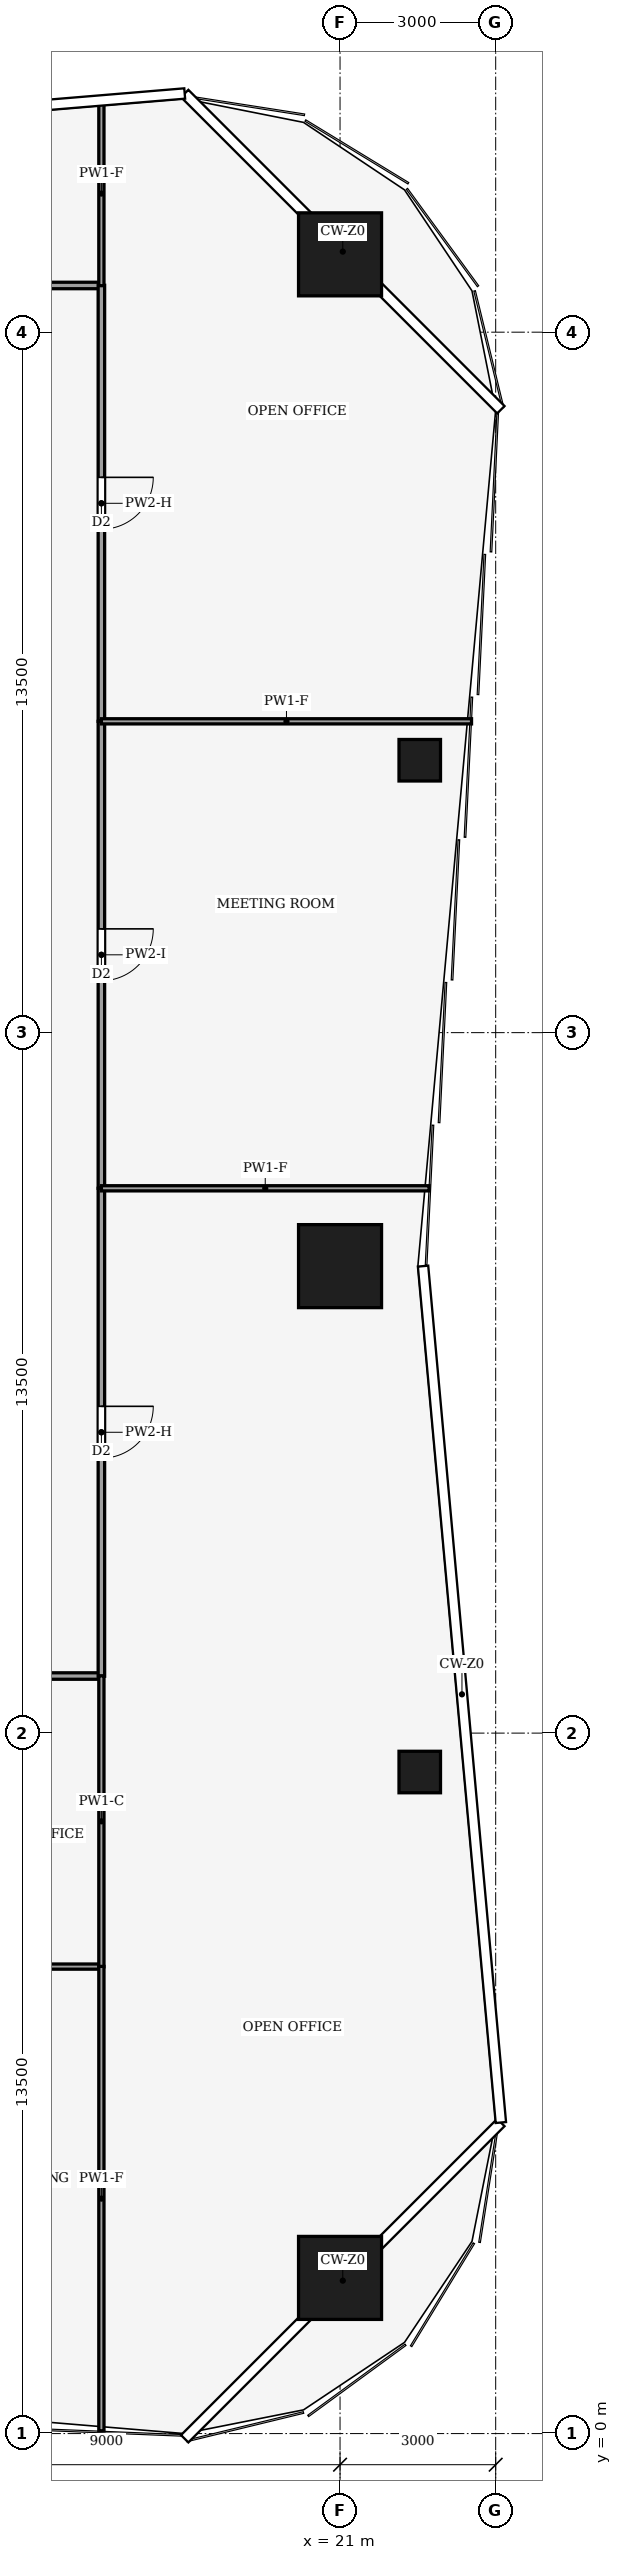
"""IFC4 building model, lengths in metres.
Left out: names, types, materials, properties, quantities, classifications, styles, units other than length and angle.
Written with IfcOpenShell. Run it as: python <this file> out.ifc"""

import sys

from ifc_helpers import new_model, si_unit, direction, frame, frame_2d, origin, origin_2d, place, context, subcontext, project, spatial, rectangle, hollow_rectangle, extrude, element, fill, save


model = new_model("IFC4")
c1 = context("Model", 3, precision=1e-05, world=origin(), true_north=direction((0.0, 1.0)))
c2 = subcontext(c1, "Body", "Model", "MODEL_VIEW")
j1 = project(units=[si_unit("LENGTHUNIT", "METRE"), si_unit("PLANEANGLEUNIT", "RADIAN")], contexts=[c1])
p1 = place(None, origin())
s1 = spatial("IfcSite", under=j1, at=p1, CompositionType="ELEMENT")
p2 = place(p1, origin())
s2 = spatial("IfcBuilding", under=s1, at=p2, CompositionType="ELEMENT")
p3 = place(p2, frame((0.0, 0.0, 46.0)))
s3 = spatial("IfcBuildingStorey", under=s2, at=p3, CompositionType="ELEMENT", Elevation=46.0)
for number, where, z_axis, x_axis in (
    (1, (21.0, 42.0, 0.0), (0.0, 0.0, 1.0), (1.0, 0.0, 0.0)),
    (2, (21.0, 22.5, 0.0), (0.0, 0.0, 1.0), (1.0, 0.0, 0.0)),
    (3, (21.0, 3.0, 0.0), (0.0, 0.0, 1.0), (1.0, 0.0, 0.0)),
):
    element("IfcColumn", number, at=place(p3, frame(where, z_axis=z_axis, x_axis=x_axis)), inside=s3, PredefinedType="COLUMN", context=c2, shape_type="SweptSolid", body=[
        extrude(hollow_rectangle(XDim=1.6, YDim=1.6, WallThickness=0.09, at=origin_2d()), origin(), (0.0, 0.0, 1.0), 4.0),
    ])
for number, where, z_axis, x_axis in (
    (4, (22.536, 12.75, 0.0), (0.0, 0.0, 1.0), (1.0, 0.0, 0.0)),
    (5, (22.536, 32.25, 0.0), (0.0, 0.0, 1.0), (1.0, 0.0, 0.0)),
):
    element("IfcColumn", number, at=place(p3, frame(where, z_axis=z_axis, x_axis=x_axis)), inside=s3, PredefinedType="COLUMN", context=c2, shape_type="SweptSolid", body=[
        extrude(hollow_rectangle(XDim=0.8, YDim=0.8, WallThickness=0.04, at=origin_2d()), origin(), (0.0, 0.0, 1.0), 4.0),
    ])
p4 = place(p3, frame((16.4, 14.6, 0.0), z_axis=(0.0, 0.0, 1.0), x_axis=(-1.0, 0.0, 0.0)))
e6 = element("IfcWall", 6, at=p4, inside=s3, PredefinedType="PARTITIONING", context=c2, shape_type="SweptSolid", body=[
    extrude(rectangle(XDim=4.4, YDim=0.125, at=frame_2d((2.2, 0.0))), origin(), (0.0, 0.0, 1.0), 3.29),
])
p5 = place(p4, frame((1.7, 0.0, 0.0)))
e7 = element("IfcOpeningElement", 7, at=p5, cuts=e6, PredefinedType="OPENING", context=c2, shape_type="SweptSolid", body=[
    extrude(rectangle(XDim=1.0, YDim=2.1, at=frame_2d((0.5, 1.05))), frame((0.0, 0.073, 0.0), z_axis=(0.0, -1.0, 0.0), x_axis=(1.0, 0.0, 0.0)), (0.0, 0.0, 1.0), 0.145),
])
p6 = place(p3, frame((6.0, 41.4, 0.0), z_axis=(0.0, 0.0, 1.0), x_axis=(1.0, 0.0, 0.0)))
e8 = element("IfcWall", 8, at=p6, inside=s3, PredefinedType="PARTITIONING", context=c2, shape_type="SweptSolid", body=[
    extrude(rectangle(XDim=10.4, YDim=0.125, at=frame_2d((5.2, 0.0))), origin(), (0.0, 0.0, 1.0), 3.54),
])
p7 = place(p6, frame((1.9, 0.0, 0.0)))
e9 = element("IfcOpeningElement", 9, at=p7, cuts=e8, PredefinedType="OPENING", context=c2, shape_type="SweptSolid", body=[
    extrude(rectangle(XDim=1.0, YDim=2.1, at=frame_2d((0.5, 1.05))), frame((0.0, 0.073, 0.0), z_axis=(0.0, -1.0, 0.0), x_axis=(1.0, 0.0, 0.0)), (0.0, 0.0, 1.0), 0.145),
])
p8 = place(p3, frame((16.4, 24.0, 0.0), z_axis=(0.0, 0.0, 1.0), x_axis=(0.0, -1.0, 0.0)))
e10 = element("IfcWall", 10, at=p8, inside=s3, PredefinedType="PARTITIONING", context=c2, shape_type="SweptSolid", body=[
    extrude(rectangle(XDim=9.404, YDim=0.125, at=frame_2d((4.702, 0.0))), origin(), (0.0, 0.0, 1.0), 3.14),
])
p9 = place(p8, frame((4.202, 0.0, 0.0)))
e11 = element("IfcOpeningElement", 11, at=p9, cuts=e10, PredefinedType="OPENING", context=c2, shape_type="SweptSolid", body=[
    extrude(rectangle(XDim=1.0, YDim=2.1, at=frame_2d((0.5, 1.05))), frame((0.0, 0.073, 0.0), z_axis=(0.0, -1.0, 0.0), x_axis=(1.0, 0.0, 0.0)), (0.0, 0.0, 1.0), 0.145),
])
p10 = place(p3, frame((16.4, 33.0, 0.0), z_axis=(0.0, 0.0, 1.0), x_axis=(0.0, -1.0, 0.0)))
e12 = element("IfcWall", 12, at=p10, inside=s3, PredefinedType="PARTITIONING", context=c2, shape_type="SweptSolid", body=[
    extrude(rectangle(XDim=9.0, YDim=0.125, at=frame_2d((4.5, 0.0))), origin(), (0.0, 0.0, 1.0), 3.48),
])
p11 = place(p10, frame((4.0, 0.0, 0.0)))
e13 = element("IfcOpeningElement", 13, at=p11, cuts=e12, PredefinedType="OPENING", context=c2, shape_type="SweptSolid", body=[
    extrude(rectangle(XDim=1.0, YDim=2.1, at=frame_2d((0.5, 1.05))), frame((0.0, 0.073, 0.0), z_axis=(0.0, -1.0, 0.0), x_axis=(1.0, 0.0, 0.0)), (0.0, 0.0, 1.0), 0.145),
])
p12 = place(p3, frame((16.4, 41.404, 0.0), z_axis=(0.0, 0.0, 1.0), x_axis=(0.0, -1.0, 0.0)))
e14 = element("IfcWall", 14, at=p12, inside=s3, PredefinedType="PARTITIONING", context=c2, shape_type="SweptSolid", body=[
    extrude(rectangle(XDim=8.404, YDim=0.125, at=frame_2d((4.202, 0.0))), origin(), (0.0, 0.0, 1.0), 3.14),
])
p13 = place(p12, frame((3.702, 0.0, 0.0)))
e15 = element("IfcOpeningElement", 15, at=p13, cuts=e14, PredefinedType="OPENING", context=c2, shape_type="SweptSolid", body=[
    extrude(rectangle(XDim=1.0, YDim=2.1, at=frame_2d((0.5, 1.05))), frame((0.0, 0.073, 0.0), z_axis=(0.0, -1.0, 0.0), x_axis=(1.0, 0.0, 0.0)), (0.0, 0.0, 1.0), 0.145),
])
p14 = place(p3, frame((16.4, 9.0, 0.0), z_axis=(0.0, 0.0, 1.0), x_axis=(-1.0, 0.0, 0.0)))
e16 = element("IfcWall", 16, at=p14, inside=s3, PredefinedType="PARTITIONING", context=c2, shape_type="SweptSolid", body=[
    extrude(rectangle(XDim=4.4, YDim=0.1, at=frame_2d((2.2, 0.0))), origin(), (0.0, 0.0, 1.0), 3.29),
])
p15 = place(p14, frame((1.7, 0.0, 0.0)))
e17 = element("IfcOpeningElement", 17, at=p15, cuts=e16, PredefinedType="OPENING", context=c2, shape_type="SweptSolid", body=[
    extrude(rectangle(XDim=1.0, YDim=2.1, at=frame_2d((0.5, 1.05))), frame((0.0, 0.06, 0.0), z_axis=(0.0, -1.0, 0.0), x_axis=(1.0, 0.0, 0.0)), (0.0, 0.0, 1.0), 0.12),
])
p16 = place(p3, frame((16.4, 8.996, 0.0), z_axis=(0.0, 0.0, 1.0), x_axis=(0.0, 1.0, 0.0)))
e18 = element("IfcWall", 18, at=p16, inside=s3, PredefinedType="PARTITIONING", context=c2, shape_type="SweptSolid", body=[
    extrude(rectangle(XDim=5.608, YDim=0.1, at=frame_2d((2.804, 0.0))), origin(), (0.0, 0.0, 1.0), 3.87),
])
p17 = place(p3, frame((16.4, 0.053, 0.0), z_axis=(0.0, 0.0, 1.0), x_axis=(0.0, 1.0, 0.0)))
e19 = element("IfcWall", 19, at=p17, inside=s3, PredefinedType="PARTITIONING", context=c2, shape_type="SweptSolid", body=[
    extrude(rectangle(XDim=8.951, YDim=0.1, at=frame_2d((4.475, 0.0))), origin(), (0.0, 0.0, 1.0), 3.04),
])
p18 = place(p3, frame((16.4, 41.396, 0.0), z_axis=(0.0, 0.0, 1.0), x_axis=(0.0, 1.0, 0.0)))
e20 = element("IfcWall", 20, at=p18, inside=s3, PredefinedType="PARTITIONING", context=c2, shape_type="SweptSolid", body=[
    extrude(rectangle(XDim=3.551, YDim=0.1, at=frame_2d((1.775, 0.0))), origin(), (0.0, 0.0, 1.0), 3.04),
])
p19 = place(p3, frame((22.716, 24.0, 0.0), z_axis=(0.0, 0.0, 1.0), x_axis=(-1.0, 0.0, 0.0)))
e21 = element("IfcWall", 21, at=p19, inside=s3, PredefinedType="PARTITIONING", context=c2, shape_type="SweptSolid", body=[
    extrude(rectangle(XDim=6.316, YDim=0.1, at=frame_2d((3.158, 0.0))), origin(), (0.0, 0.0, 1.0), 3.04),
])
p20 = place(p3, frame((23.534, 33.0, 0.0), z_axis=(0.0, 0.0, 1.0), x_axis=(-1.0, 0.0, 0.0)))
e22 = element("IfcWall", 22, at=p20, inside=s3, PredefinedType="PARTITIONING", context=c2, shape_type="SweptSolid", body=[
    extrude(rectangle(XDim=7.135, YDim=0.1, at=frame_2d((3.567, 0.0))), origin(), (0.0, 0.0, 1.0), 3.04),
])
p21 = place(p9, origin())
e23 = element("IfcDoor", 23, at=p21, inside=s3, OperationType="SINGLE_SWING_RIGHT", PredefinedType="DOOR", context=c2, shape_type="SweptSolid", body=[
    extrude(rectangle(XDim=1.0, YDim=2.1, at=frame_2d((0.5, 1.05))), frame((0.0, 0.025, 0.0), z_axis=(0.0, -1.0, 0.0), x_axis=(1.0, 0.0, 0.0)), (0.0, 0.0, 1.0), 0.05),
])
fill(e11, e23)
p22 = place(p11, origin())
e24 = element("IfcDoor", 24, at=p22, inside=s3, OperationType="SINGLE_SWING_LEFT", PredefinedType="DOOR", context=c2, shape_type="SweptSolid", body=[
    extrude(rectangle(XDim=1.0, YDim=2.1, at=frame_2d((0.5, 1.05))), frame((0.0, 0.025, 0.0), z_axis=(0.0, -1.0, 0.0), x_axis=(1.0, 0.0, 0.0)), (0.0, 0.0, 1.0), 0.05),
])
fill(e13, e24)
p23 = place(p13, origin())
e25 = element("IfcDoor", 25, at=p23, inside=s3, OperationType="SINGLE_SWING_RIGHT", PredefinedType="DOOR", context=c2, shape_type="SweptSolid", body=[
    extrude(rectangle(XDim=1.0, YDim=2.1, at=frame_2d((0.5, 1.05))), frame((0.0, 0.025, 0.0), z_axis=(0.0, -1.0, 0.0), x_axis=(1.0, 0.0, 0.0)), (0.0, 0.0, 1.0), 0.05),
])
fill(e15, e25)
save(model, sys.argv[1])
